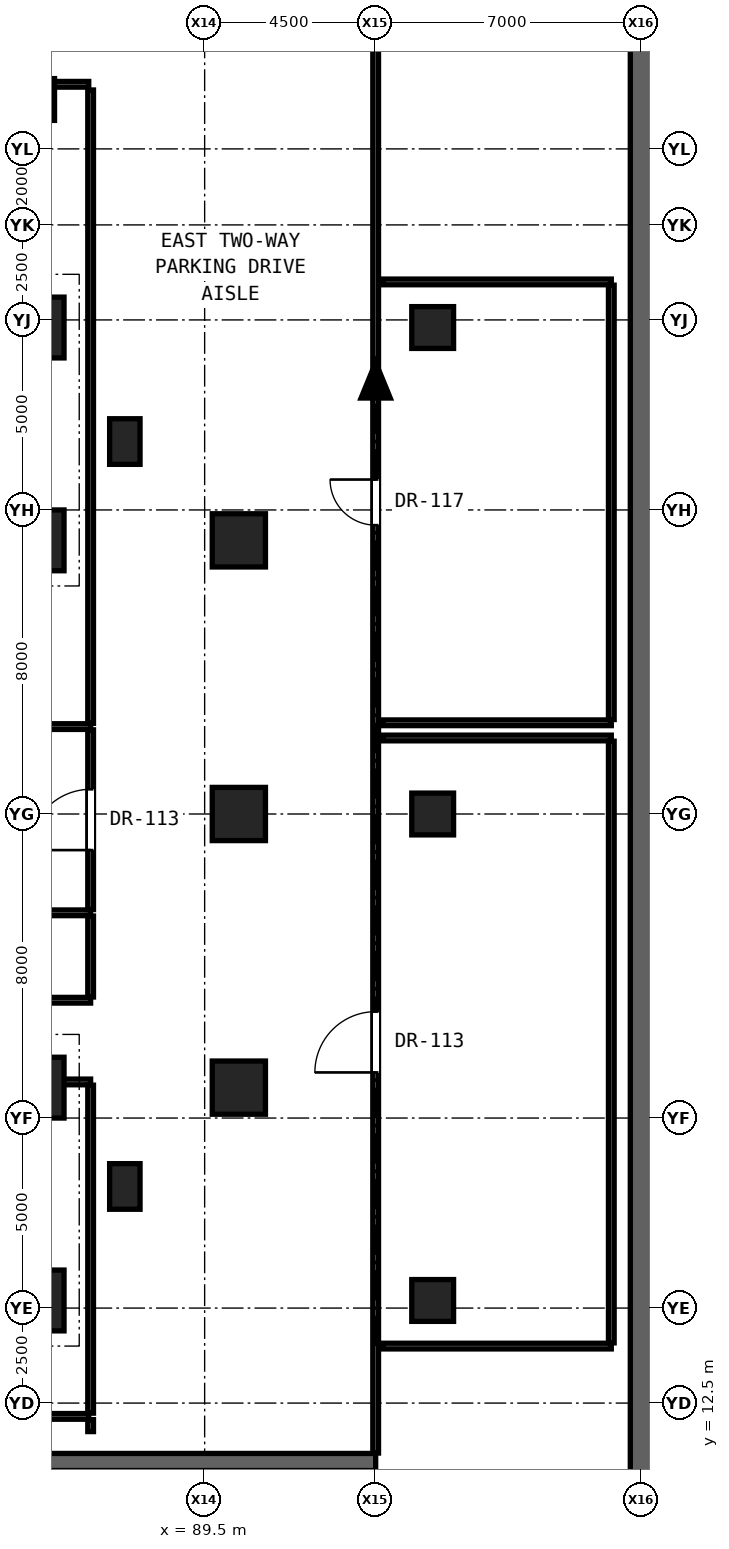
"""IFC4 building model, lengths in metres.
Left out: names, types, materials, properties, quantities, classifications, styles, units other than length and angle.
Written with IfcOpenShell. Run it as: python <this file> out.ifc"""

import sys

from ifc_helpers import new_model, si_unit, direction, frame, frame_2d, origin, origin_2d, place, context, subcontext, project, spatial, rectangle, hollow_rectangle, extrude, element, fill, save


model = new_model("IFC4")
c1 = context("Model", 3, precision=1e-05, world=origin(), true_north=direction((0.0, 1.0)))
c2 = subcontext(c1, "Body", "Model", "MODEL_VIEW")
j1 = project(units=[si_unit("LENGTHUNIT", "METRE"), si_unit("PLANEANGLEUNIT", "RADIAN")], contexts=[c1])
p1 = place(None, origin())
s1 = spatial("IfcSite", under=j1, at=p1, CompositionType="ELEMENT")
p2 = place(p1, origin())
s2 = spatial("IfcBuilding", under=s1, at=p2, CompositionType="ELEMENT")
p3 = place(p2, frame((0.0, 0.0, -4.8)))
s3 = spatial("IfcBuildingStorey", under=s2, at=p3, CompositionType="ELEMENT", Elevation=-4.8)
p4 = place(p3, frame((101.0, 7.0, 0.0), z_axis=(0.0, 0.0, 1.0), x_axis=(0.0, 1.0, 0.0)))
e1 = element("IfcWall", 1, at=p4, inside=s3, PredefinedType="USERDEFINED", context=c2, shape_type="SweptSolid", body=[
    extrude(rectangle(XDim=42.0, YDim=0.6, at=frame_2d((21.0, 0.0))), origin(), (0.0, 0.0, 1.0), 4.62),
])
for number, where, z_axis, x_axis in (
    (2, (85.0, 15.2, 0.0), (0.0, 0.0, 1.0), (1.0, 0.0, 0.0)),
    (3, (85.0, 20.8, 0.0), (0.0, 0.0, 1.0), (1.0, 0.0, 0.0)),
    (4, (85.0, 35.2, 0.0), (0.0, 0.0, 1.0), (1.0, 0.0, 0.0)),
    (5, (85.0, 40.8, 0.0), (0.0, 0.0, 1.0), (1.0, 0.0, 0.0)),
):
    element("IfcColumn", number, at=place(p3, frame(where, z_axis=z_axis, x_axis=x_axis)), inside=s3, PredefinedType="COLUMN", context=c2, shape_type="SweptSolid", body=[
        extrude(rectangle(XDim=1.6, YDim=1.6, at=origin_2d()), origin(), (0.0, 0.0, 1.0), 4.8),
    ])
for number, where, z_axis, x_axis in (
    (6, (90.4, 20.8, 0.0), (0.0, 0.0, 1.0), (1.0, 0.0, 0.0)),
    (7, (90.4, 28.0, 0.0), (0.0, 0.0, 1.0), (1.0, 0.0, 0.0)),
    (8, (90.4, 35.2, 0.0), (0.0, 0.0, 1.0), (1.0, 0.0, 0.0)),
):
    element("IfcColumn", number, at=place(p3, frame(where, z_axis=z_axis, x_axis=x_axis)), inside=s3, PredefinedType="COLUMN", context=c2, shape_type="SweptSolid", body=[
        extrude(hollow_rectangle(XDim=1.4, YDim=1.4, WallThickness=0.08, at=origin_2d()), origin(), (0.0, 0.0, 1.0), 4.8),
    ])
for number, where, z_axis, x_axis in (
    (9, (87.4, 18.2, 0.0), (0.0, 0.0, 1.0), (1.0, 0.0, 0.0)),
    (10, (87.4, 37.8, 0.0), (0.0, 0.0, 1.0), (1.0, 0.0, 0.0)),
):
    element("IfcColumn", number, at=place(p3, frame(where, z_axis=z_axis, x_axis=x_axis)), inside=s3, PredefinedType="PILASTER", context=c2, shape_type="SweptSolid", body=[
        extrude(rectangle(XDim=0.8, YDim=1.2, at=origin_2d()), origin(), (0.0, 0.0, 1.0), 4.8),
    ])
for number, where, z_axis, x_axis in (
    (11, (85.0, 46.8, 0.0), (0.0, 0.0, 1.0), (1.0, 0.0, 0.0)),
    (12, (95.5, 15.2, 0.0), (0.0, 0.0, 1.0), (1.0, 0.0, 0.0)),
    (13, (95.5, 28.0, 0.0), (0.0, 0.0, 1.0), (1.0, 0.0, 0.0)),
    (14, (95.5, 40.8, 0.0), (0.0, 0.0, 1.0), (1.0, 0.0, 0.0)),
):
    element("IfcColumn", number, at=place(p3, frame(where, z_axis=z_axis, x_axis=x_axis)), inside=s3, PredefinedType="COLUMN", context=c2, shape_type="SweptSolid", body=[
        extrude(rectangle(XDim=1.1, YDim=1.1, at=origin_2d()), origin(), (0.0, 0.0, 1.0), 4.8),
    ])
p5 = place(p3, frame((3.2, 10.95, 0.0), z_axis=(0.0, 0.0, 1.0), x_axis=(1.0, 0.0, 0.0)))
e15 = element("IfcWall", 15, at=p5, inside=s3, PredefinedType="SHEAR", context=c2, shape_type="SweptSolid", body=[
    extrude(rectangle(XDim=90.8, YDim=0.45, at=frame_2d((45.4, 0.0))), origin(), (0.0, 0.0, 1.0), 4.48),
])
p6 = place(p5, frame((18.57, 0.0, 0.0)))
e16 = element("IfcOpeningElement", 16, at=p6, cuts=e15, PredefinedType="OPENING", context=c2, shape_type="SweptSolid", body=[
    extrude(rectangle(XDim=1.15, YDim=2.2, at=frame_2d((0.575, 1.1))), frame((0.0, 0.235, 0.0), z_axis=(0.0, -1.0, 0.0), x_axis=(1.0, 0.0, 0.0)), (0.0, 0.0, 1.0), 0.47),
])
p7 = place(p5, frame((66.17, 0.0, 0.0)))
e17 = element("IfcOpeningElement", 17, at=p7, cuts=e15, PredefinedType="OPENING", context=c2, shape_type="SweptSolid", body=[
    extrude(rectangle(XDim=1.15, YDim=2.2, at=frame_2d((0.575, 1.1))), frame((0.0, 0.235, 0.0), z_axis=(0.0, -1.0, 0.0), x_axis=(1.0, 0.0, 0.0)), (0.0, 0.0, 1.0), 0.47),
])
p8 = place(p5, frame((31.0, 0.0, 0.0)))
e18 = element("IfcOpeningElement", 18, at=p8, cuts=e15, PredefinedType="OPENING", context=c2, shape_type="SweptSolid", body=[
    extrude(rectangle(XDim=1.2, YDim=2.25, at=frame_2d((0.6, 1.125))), frame((0.0, 0.235, 0.0), z_axis=(0.0, -1.0, 0.0), x_axis=(1.0, 0.0, 0.0)), (0.0, 0.0, 1.0), 0.47),
])
p9 = place(p5, frame((52.45, 0.0, 0.0)))
e19 = element("IfcOpeningElement", 19, at=p9, cuts=e15, PredefinedType="OPENING", context=c2, shape_type="SweptSolid", body=[
    extrude(rectangle(XDim=1.2, YDim=2.25, at=frame_2d((0.6, 1.125))), frame((0.0, 0.235, 0.0), z_axis=(0.0, -1.0, 0.0), x_axis=(1.0, 0.0, 0.0)), (0.0, 0.0, 1.0), 0.47),
])
p10 = place(p3, frame((56.85, 12.15, 0.0), z_axis=(0.0, 0.0, 1.0), x_axis=(1.0, 0.0, 0.0)))
e20 = element("IfcWall", 20, at=p10, inside=s3, PredefinedType="PARTITIONING", context=c2, shape_type="SweptSolid", body=[
    extrude(rectangle(XDim=29.6, YDim=0.15, at=frame_2d((14.8, 0.0))), origin(), (0.0, 0.0, 1.0), 3.252),
])
p11 = place(p3, frame((94.2, 14.0, 0.0), z_axis=(0.0, 0.0, 1.0), x_axis=(1.0, 0.0, 0.0)))
e21 = element("IfcWall", 21, at=p11, inside=s3, PredefinedType="PARTITIONING", context=c2, shape_type="SweptSolid", body=[
    extrude(rectangle(XDim=6.0, YDim=0.15, at=frame_2d((3.0, 0.0))), origin(), (0.0, 0.0, 1.0), 4.3),
])
p12 = place(p3, frame((85.37, 20.95, 0.0), z_axis=(0.0, 0.0, 1.0), x_axis=(1.0, 0.0, 0.0)))
e22 = element("IfcWall", 22, at=p12, inside=s3, PredefinedType="PARTITIONING", context=c2, shape_type="SweptSolid", body=[
    extrude(rectangle(XDim=1.13, YDim=0.15, at=frame_2d((0.565, 0.0))), origin(), (0.0, 0.0, 1.0), 3.372),
])
p13 = place(p3, frame((56.8, 23.1, 0.0), z_axis=(0.0, 0.0, 1.0), x_axis=(1.0, 0.0, 0.0)))
e23 = element("IfcWall", 23, at=p13, inside=s3, PredefinedType="PARTITIONING", context=c2, shape_type="SweptSolid", body=[
    extrude(rectangle(XDim=29.7, YDim=0.15, at=frame_2d((14.85, 0.0))), origin(), (0.0, 0.0, 1.0), 3.252),
])
p14 = place(p3, frame((68.4, 25.4, 0.0), z_axis=(0.0, 0.0, 1.0), x_axis=(1.0, 0.0, 0.0)))
e24 = element("IfcWall", 24, at=p14, inside=s3, PredefinedType="PARTITIONING", context=c2, shape_type="SweptSolid", body=[
    extrude(rectangle(XDim=18.1, YDim=0.15, at=frame_2d((9.05, 0.0))), origin(), (0.0, 0.0, 1.0), 3.545),
])
p15 = place(p3, frame((94.2, 30.0, 0.0), z_axis=(0.0, 0.0, 1.0), x_axis=(1.0, 0.0, 0.0)))
e25 = element("IfcWall", 25, at=p15, inside=s3, PredefinedType="PARTITIONING", context=c2, shape_type="SweptSolid", body=[
    extrude(rectangle(XDim=6.0, YDim=0.15, at=frame_2d((3.0, 0.0))), origin(), (0.0, 0.0, 1.0), 3.436),
])
p16 = place(p3, frame((56.8, 30.3, 0.0), z_axis=(0.0, 0.0, 1.0), x_axis=(1.0, 0.0, 0.0)))
e26 = element("IfcWall", 26, at=p16, inside=s3, PredefinedType="PARTITIONING", context=c2, shape_type="SweptSolid", body=[
    extrude(rectangle(XDim=29.7, YDim=0.15, at=frame_2d((14.85, 0.0))), origin(), (0.0, 0.0, 1.0), 3.252),
])
p17 = place(p3, frame((94.2, 30.4, 0.0), z_axis=(0.0, 0.0, 1.0), x_axis=(1.0, 0.0, 0.0)))
e27 = element("IfcWall", 27, at=p17, inside=s3, PredefinedType="PARTITIONING", context=c2, shape_type="SweptSolid", body=[
    extrude(rectangle(XDim=6.0, YDim=0.15, at=frame_2d((3.0, 0.0))), origin(), (0.0, 0.0, 1.0), 3.436),
])
p18 = place(p3, frame((94.2, 42.0, 0.0), z_axis=(0.0, 0.0, 1.0), x_axis=(1.0, 0.0, 0.0)))
e28 = element("IfcWall", 28, at=p18, inside=s3, PredefinedType="PARTITIONING", context=c2, shape_type="SweptSolid", body=[
    extrude(rectangle(XDim=6.0, YDim=0.15, at=frame_2d((3.0, 0.0))), origin(), (0.0, 0.0, 1.0), 4.3),
])
p19 = place(p3, frame((56.85, 47.2, 0.0), z_axis=(0.0, 0.0, 1.0), x_axis=(1.0, 0.0, 0.0)))
e29 = element("IfcWall", 29, at=p19, inside=s3, PredefinedType="PARTITIONING", context=c2, shape_type="SweptSolid", body=[
    extrude(rectangle(XDim=29.6, YDim=0.15, at=frame_2d((14.8, 0.0))), origin(), (0.0, 0.0, 1.0), 4.3),
])
p20 = place(p3, frame((86.5, 11.75, 0.0), z_axis=(0.0, 0.0, 1.0), x_axis=(0.0, 1.0, 0.0)))
e30 = element("IfcWall", 30, at=p20, inside=s3, PredefinedType="PARTITIONING", context=c2, shape_type="SweptSolid", body=[
    extrude(rectangle(XDim=0.315, YDim=0.15, at=frame_2d((0.157, 0.0))), origin(), (0.0, 0.0, 1.0), 4.3),
])
p21 = place(p3, frame((86.5, 12.235, 0.0), z_axis=(0.0, 0.0, 1.0), x_axis=(0.0, 1.0, 0.0)))
e31 = element("IfcWall", 31, at=p21, inside=s3, PredefinedType="PARTITIONING", context=c2, shape_type="SweptSolid", body=[
    extrude(rectangle(XDim=8.63, YDim=0.15, at=frame_2d((4.315, 0.0))), origin(), (0.0, 0.0, 1.0), 3.372),
])
p22 = place(p3, frame((86.5, 23.185, 0.0), z_axis=(0.0, 0.0, 1.0), x_axis=(0.0, 1.0, 0.0)))
e32 = element("IfcWall", 32, at=p22, inside=s3, PredefinedType="PARTITIONING", context=c2, shape_type="SweptSolid", body=[
    extrude(rectangle(XDim=2.13, YDim=0.15, at=frame_2d((1.065, 0.0))), origin(), (0.0, 0.0, 1.0), 4.3),
])
p23 = place(p3, frame((86.5, 25.485, 0.0), z_axis=(0.0, 0.0, 1.0), x_axis=(0.0, 1.0, 0.0)))
e33 = element("IfcWall", 33, at=p23, inside=s3, PredefinedType="PARTITIONING", context=c2, shape_type="SweptSolid", body=[
    extrude(rectangle(XDim=4.73, YDim=0.15, at=frame_2d((2.365, 0.0))), origin(), (0.0, 0.0, 1.0), 3.699),
])
p24 = place(p23, frame((1.565, 0.0, 0.0)))
e34 = element("IfcOpeningElement", 34, at=p24, cuts=e33, PredefinedType="OPENING", context=c2, shape_type="SweptSolid", body=[
    extrude(rectangle(XDim=1.6, YDim=2.3, at=frame_2d((0.8, 1.15))), frame((0.0, 0.085, 0.0), z_axis=(0.0, -1.0, 0.0), x_axis=(1.0, 0.0, 0.0)), (0.0, 0.0, 1.0), 0.17),
])
p25 = place(p3, frame((86.5, 30.385, 0.0), z_axis=(0.0, 0.0, 1.0), x_axis=(0.0, 1.0, 0.0)))
e35 = element("IfcWall", 35, at=p25, inside=s3, PredefinedType="PARTITIONING", context=c2, shape_type="SweptSolid", body=[
    extrude(rectangle(XDim=16.665, YDim=0.15, at=frame_2d((8.333, 0.0))), origin(), (0.0, 0.0, 1.0), 3.372),
])
p26 = place(p3, frame((94.0, 11.185, 0.0), z_axis=(0.0, 0.0, 1.0), x_axis=(0.0, 1.0, 0.0)))
e36 = element("IfcWall", 36, at=p26, inside=s3, PredefinedType="PARTITIONING", context=c2, shape_type="SweptSolid", body=[
    extrude(rectangle(XDim=42.43, YDim=0.15, at=frame_2d((21.215, 0.0))), origin(), (0.0, 0.0, 1.0), 3.436),
])
p27 = place(p26, frame((10.015, 0.0, 0.0)))
e37 = element("IfcOpeningElement", 37, at=p27, cuts=e36, PredefinedType="OPENING", context=c2, shape_type="SweptSolid", body=[
    extrude(rectangle(XDim=1.6, YDim=2.3, at=frame_2d((0.8, 1.15))), frame((0.0, 0.085, 0.0), z_axis=(0.0, -1.0, 0.0), x_axis=(1.0, 0.0, 0.0)), (0.0, 0.0, 1.0), 0.17),
])
p28 = place(p26, frame((24.415, 0.0, 0.0)))
e38 = element("IfcOpeningElement", 38, at=p28, cuts=e36, PredefinedType="OPENING", context=c2, shape_type="SweptSolid", body=[
    extrude(rectangle(XDim=1.2, YDim=2.25, at=frame_2d((0.6, 1.125))), frame((0.0, 0.085, 0.0), z_axis=(0.0, -1.0, 0.0), x_axis=(1.0, 0.0, 0.0)), (0.0, 0.0, 1.0), 0.17),
])
p29 = place(p3, frame((100.2, 14.085, 0.0), z_axis=(0.0, 0.0, 1.0), x_axis=(0.0, 1.0, 0.0)))
e39 = element("IfcWall", 39, at=p29, inside=s3, PredefinedType="PARTITIONING", context=c2, shape_type="SweptSolid", body=[
    extrude(rectangle(XDim=15.83, YDim=0.15, at=frame_2d((7.915, 0.0))), origin(), (0.0, 0.0, 1.0), 4.3),
])
p30 = place(p3, frame((100.2, 30.485, 0.0), z_axis=(0.0, 0.0, 1.0), x_axis=(0.0, 1.0, 0.0)))
e40 = element("IfcWall", 40, at=p30, inside=s3, PredefinedType="PARTITIONING", context=c2, shape_type="SweptSolid", body=[
    extrude(rectangle(XDim=11.43, YDim=0.15, at=frame_2d((5.715, 0.0))), origin(), (0.0, 0.0, 1.0), 4.3),
])
p31 = place(p27, origin())
e41 = element("IfcDoor", 41, at=p31, inside=s3, OperationType="SINGLE_SWING_LEFT", PredefinedType="DOOR", context=c2, shape_type="SweptSolid", body=[
    extrude(rectangle(XDim=1.6, YDim=2.3, at=frame_2d((0.8, 1.15))), frame((0.0, 0.025, 0.0), z_axis=(0.0, -1.0, 0.0), x_axis=(1.0, 0.0, 0.0)), (0.0, 0.0, 1.0), 0.05),
])
fill(e37, e41)
p32 = place(p28, origin())
e42 = element("IfcDoor", 42, at=p32, inside=s3, OperationType="SINGLE_SWING_RIGHT", PredefinedType="DOOR", context=c2, shape_type="SweptSolid", body=[
    extrude(rectangle(XDim=1.2, YDim=2.25, at=frame_2d((0.6, 1.125))), frame((0.0, 0.025, 0.0), z_axis=(0.0, -1.0, 0.0), x_axis=(1.0, 0.0, 0.0)), (0.0, 0.0, 1.0), 0.05),
])
fill(e38, e42)
p33 = place(p24, origin())
e43 = element("IfcDoor", 43, at=p33, inside=s3, OperationType="SINGLE_SWING_LEFT", PredefinedType="DOOR", context=c2, shape_type="SweptSolid", body=[
    extrude(rectangle(XDim=1.6, YDim=2.3, at=frame_2d((0.8, 1.15))), frame((0.0, 0.025, 0.0), z_axis=(0.0, -1.0, 0.0), x_axis=(1.0, 0.0, 0.0)), (0.0, 0.0, 1.0), 0.05),
])
fill(e34, e43)
save(model, sys.argv[1])
